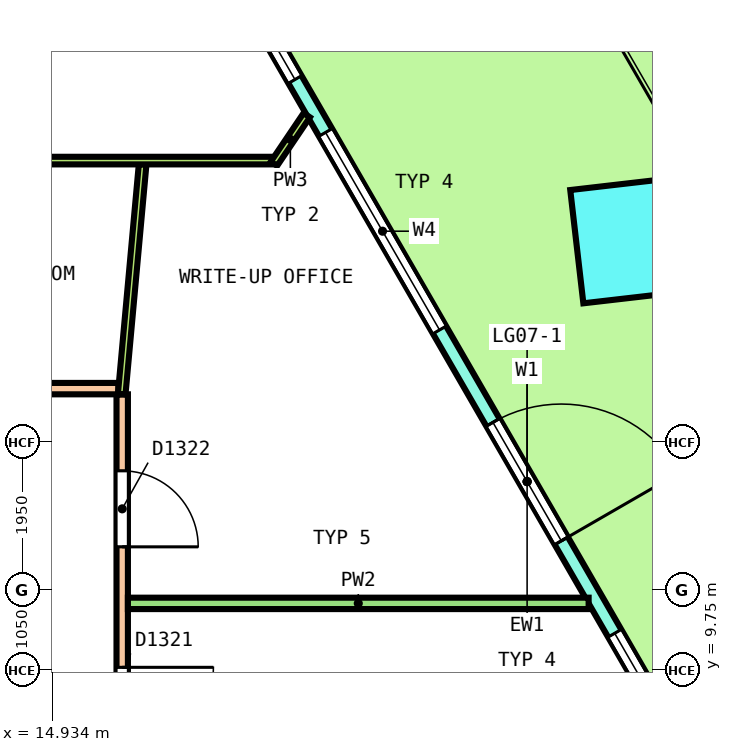
"""IFC4 building model, lengths in metres.
Left out: names, types, materials, properties, quantities, classifications, styles, units other than length and angle.
Written with IfcOpenShell. Run it as: python <this file> out.ifc"""

import sys

from ifc_helpers import new_model, si_unit, direction, frame, frame_2d, origin, origin_2d, place, context, subcontext, project, spatial, polyline, rectangle, outline, extrude, element, fill, save


model = new_model("IFC4")
c1 = context("Model", 3, precision=1e-05, world=origin(), true_north=direction((0.0, 1.0)))
c2 = subcontext(c1, "Body", "Model", "MODEL_VIEW")
j1 = project(units=[si_unit("LENGTHUNIT", "METRE"), si_unit("PLANEANGLEUNIT", "RADIAN")], contexts=[c1])
p1 = place(None, origin())
s1 = spatial("IfcSite", under=j1, at=p1, CompositionType="ELEMENT")
p2 = place(p1, origin())
s2 = spatial("IfcBuilding", under=s1, at=p2, CompositionType="ELEMENT")
p3 = place(p2, frame((0.0, 0.0, 32.2)))
s3 = spatial("IfcBuildingStorey", under=s2, at=p3, CompositionType="ELEMENT", Elevation=32.2)
p4 = place(p3, frame((22.576, 15.404, 0.0), z_axis=(0.029040860623, 0.012532155622, 0.999499661576), x_axis=(-0.499041572146, 0.866570424295, 0.003634419767)))
e1 = element("IfcColumn", 1, at=p4, inside=s3, PredefinedType="COLUMN", context=c2, shape_type="SweptSolid", body=[
    extrude(rectangle(XDim=1.5, YDim=1.5, at=origin_2d()), origin(), (0.0, 0.0, 1.0), 4.052),
])
p5 = place(p3, frame((25.932, 3.99, 0.0), z_axis=(0.0, 0.0, 1.0), x_axis=(-0.500001707189, 0.866024418136, 0.0)))
e2 = element("IfcWall", 2, at=p5, inside=s3, PredefinedType="SOLIDWALL", context=c2, shape_type="SweptSolid", body=[
    extrude(outline(polyline([(-0.027, -0.1), (0.977, -0.1), (1.981, -0.1), (2.985, -0.1), (3.989, -0.1), (4.993, -0.1), (5.997, -0.1), (7.0, -0.1), (8.004, -0.1), (9.008, -0.1), (10.012, -0.1), (11.016, -0.1), (12.02, -0.1), (13.024, -0.1), (14.028, -0.1), (15.032, -0.1), (16.036, -0.1), (17.04, -0.1), (18.043, -0.1), (19.047, -0.1), (18.994, 0.1), (17.995, 0.1), (16.997, 0.1), (15.999, 0.1), (15.001, 0.1), (14.002, 0.1), (13.004, 0.1), (12.006, 0.1), (11.008, 0.1), (10.009, 0.1), (9.011, 0.1), (8.013, 0.1), (7.015, 0.1), (6.016, 0.1), (5.018, 0.1), (4.02, 0.1), (3.022, 0.1), (2.023, 0.1), (1.025, 0.1), (0.027, 0.1), (-0.027, -0.1)])), origin(), (0.0, 0.0, 1.0), 4.1),
])
p6 = place(p5, frame((0.402, 0.0, 0.1)))
e3 = element("IfcOpeningElement", 3, at=p6, cuts=e2, PredefinedType="OPENING", context=c2, shape_type="SweptSolid", body=[
    extrude(rectangle(XDim=3.0, YDim=2.9, at=frame_2d((1.5, 1.45))), frame((0.0, 0.11, 0.0), z_axis=(0.0, -1.0, 0.0), x_axis=(1.0, 0.0, 0.0)), (0.0, 0.0, 1.0), 0.22),
])
p7 = place(p5, frame((4.206, 0.0, 0.1)))
e4 = element("IfcOpeningElement", 4, at=p7, cuts=e2, PredefinedType="OPENING", context=c2, shape_type="SweptSolid", body=[
    extrude(rectangle(XDim=3.0, YDim=2.9, at=frame_2d((1.5, 1.45))), frame((0.0, 0.11, 0.0), z_axis=(0.0, -1.0, 0.0), x_axis=(1.0, 0.0, 0.0)), (0.0, 0.0, 1.0), 0.22),
])
p8 = place(p5, frame((8.61, 0.0, 0.0)))
e5 = element("IfcOpeningElement", 5, at=p8, cuts=e2, PredefinedType="OPENING", context=c2, shape_type="SweptSolid", body=[
    extrude(rectangle(XDim=1.8, YDim=2.4, at=frame_2d((0.9, 1.2))), frame((0.0, 0.11, 0.0), z_axis=(0.0, -1.0, 0.0), x_axis=(1.0, 0.0, 0.0)), (0.0, 0.0, 1.0), 0.22),
])
p9 = place(p5, frame((8.61, 0.0, 2.55)))
e6 = element("IfcOpeningElement", 6, at=p9, cuts=e2, PredefinedType="OPENING", context=c2, shape_type="SweptSolid", body=[
    extrude(rectangle(XDim=1.8, YDim=0.45, at=frame_2d((0.9, 0.225))), frame((0.0, 0.11, 0.0), z_axis=(0.0, -1.0, 0.0), x_axis=(1.0, 0.0, 0.0)), (0.0, 0.0, 1.0), 0.22),
])
p10 = place(p5, frame((11.814, 0.0, 0.1)))
e7 = element("IfcOpeningElement", 7, at=p10, cuts=e2, PredefinedType="OPENING", context=c2, shape_type="SweptSolid", body=[
    extrude(rectangle(XDim=3.0, YDim=2.9, at=frame_2d((1.5, 1.45))), frame((0.0, 0.11, 0.0), z_axis=(0.0, -1.0, 0.0), x_axis=(1.0, 0.0, 0.0)), (0.0, 0.0, 1.0), 0.22),
])
p11 = place(p5, frame((15.618, 0.0, 0.1)))
e8 = element("IfcOpeningElement", 8, at=p11, cuts=e2, PredefinedType="OPENING", context=c2, shape_type="SweptSolid", body=[
    extrude(rectangle(XDim=3.0, YDim=2.9, at=frame_2d((1.5, 1.45))), frame((0.0, 0.11, 0.0), z_axis=(0.0, -1.0, 0.0), x_axis=(1.0, 0.0, 0.0)), (0.0, 0.0, 1.0), 0.22),
])
p12 = place(p3, frame((15.85, -13.375, 0.0), z_axis=(0.0, 0.0, 1.0), x_axis=(0.0, 1.0, 0.0)))
e9 = element("IfcWall", 9, at=p12, inside=s3, PredefinedType="PARTITIONING", context=c2, shape_type="SweptSolid", body=[
    extrude(rectangle(XDim=26.75, YDim=0.15, at=frame_2d((13.375, 0.0))), origin(), (0.0, 0.0, 1.0), 3.05),
])
p13 = place(p12, frame((14.212, 0.0, 0.0)))
e10 = element("IfcOpeningElement", 10, at=p13, cuts=e9, PredefinedType="OPENING", context=c2, shape_type="SweptSolid", body=[
    extrude(rectangle(XDim=1.0, YDim=2.1, at=frame_2d((0.5, 1.05))), frame((0.0, 0.085, 0.0), z_axis=(0.0, -1.0, 0.0), x_axis=(1.0, 0.0, 0.0)), (0.0, 0.0, 1.0), 0.17),
])
p14 = place(p12, frame((21.958, 0.0, 0.0)))
e11 = element("IfcOpeningElement", 11, at=p14, cuts=e9, PredefinedType="OPENING", context=c2, shape_type="SweptSolid", body=[
    extrude(rectangle(XDim=1.2, YDim=2.1, at=frame_2d((0.6, 1.05))), frame((0.0, 0.085, 0.0), z_axis=(0.0, -1.0, 0.0), x_axis=(1.0, 0.0, 0.0)), (0.0, 0.0, 1.0), 0.17),
])
p15 = place(p12, frame((24.743, 0.0, 0.0)))
e12 = element("IfcOpeningElement", 12, at=p15, cuts=e9, PredefinedType="OPENING", context=c2, shape_type="SweptSolid", body=[
    extrude(rectangle(XDim=1.0, YDim=2.1, at=frame_2d((0.5, 1.05))), frame((0.0, 0.085, 0.0), z_axis=(0.0, -1.0, 0.0), x_axis=(1.0, 0.0, 0.0)), (0.0, 0.0, 1.0), 0.17),
])
p16 = place(p12, frame((1.451, 0.0, 0.0)))
e13 = element("IfcOpeningElement", 13, at=p16, cuts=e9, PredefinedType="OPENING", context=c2, shape_type="SweptSolid", body=[
    extrude(rectangle(XDim=1.0, YDim=2.1, at=frame_2d((0.5, 1.05))), frame((0.0, 0.085, 0.0), z_axis=(0.0, -1.0, 0.0), x_axis=(1.0, 0.0, 0.0)), (0.0, 0.0, 1.0), 0.17),
])
p17 = place(p12, frame((4.671, 0.0, 0.0)))
e14 = element("IfcOpeningElement", 14, at=p17, cuts=e9, PredefinedType="OPENING", context=c2, shape_type="SweptSolid", body=[
    extrude(rectangle(XDim=1.2, YDim=2.1, at=frame_2d((0.6, 1.05))), frame((0.0, 0.085, 0.0), z_axis=(0.0, -1.0, 0.0), x_axis=(1.0, 0.0, 0.0)), (0.0, 0.0, 1.0), 0.17),
])
p18 = place(p3, frame((-15.775, 13.45, 0.0), z_axis=(0.0, 0.0, 1.0), x_axis=(1.0, 0.0, 0.0)))
e15 = element("IfcWall", 15, at=p18, inside=s3, PredefinedType="PARTITIONING", context=c2, shape_type="SweptSolid", body=[
    extrude(rectangle(XDim=31.575, YDim=0.15, at=frame_2d((15.788, 0.0))), origin(), (0.0, 0.0, 1.0), 3.05),
])
p19 = place(p18, frame((28.448, 0.0, 0.0)))
e16 = element("IfcOpeningElement", 16, at=p19, cuts=e15, PredefinedType="OPENING", context=c2, shape_type="SweptSolid", body=[
    extrude(rectangle(XDim=1.0, YDim=2.1, at=frame_2d((0.5, 1.05))), frame((0.0, 0.085, 0.0), z_axis=(0.0, -1.0, 0.0), x_axis=(1.0, 0.0, 0.0)), (0.0, 0.0, 1.0), 0.17),
])
p20 = place(p18, frame((24.146, 0.0, 0.0)))
e17 = element("IfcOpeningElement", 17, at=p20, cuts=e15, PredefinedType="OPENING", context=c2, shape_type="SweptSolid", body=[
    extrude(rectangle(XDim=1.2, YDim=2.1, at=frame_2d((0.6, 1.05))), frame((0.0, 0.085, 0.0), z_axis=(0.0, -1.0, 0.0), x_axis=(1.0, 0.0, 0.0)), (0.0, 0.0, 1.0), 0.17),
])
p21 = place(p18, frame((18.378, 0.0, 0.0)))
e18 = element("IfcOpeningElement", 18, at=p21, cuts=e15, PredefinedType="OPENING", context=c2, shape_type="SweptSolid", body=[
    extrude(rectangle(XDim=1.0, YDim=2.1, at=frame_2d((0.5, 1.05))), frame((0.0, 0.085, 0.0), z_axis=(0.0, -1.0, 0.0), x_axis=(1.0, 0.0, 0.0)), (0.0, 0.0, 1.0), 0.17),
])
p22 = place(p18, frame((3.288, 0.0, 0.0)))
e19 = element("IfcOpeningElement", 19, at=p22, cuts=e15, PredefinedType="OPENING", context=c2, shape_type="SweptSolid", body=[
    extrude(rectangle(XDim=1.0, YDim=2.1, at=frame_2d((0.5, 1.05))), frame((0.0, 0.085, 0.0), z_axis=(0.0, -1.0, 0.0), x_axis=(1.0, 0.0, 0.0)), (0.0, 0.0, 1.0), 0.17),
])
p23 = place(p3, frame((15.925, 10.625, 0.0), z_axis=(0.0, 0.0, 1.0), x_axis=(1.0, 0.0, 0.0)))
e20 = element("IfcWall", 20, at=p23, inside=s3, PredefinedType="PARTITIONING", context=c2, shape_type="SweptSolid", body=[
    extrude(rectangle(XDim=6.061, YDim=0.15, at=frame_2d((3.031, 0.0))), origin(), (0.0, 0.0, 1.0), 3.05),
])
p24 = place(p3, frame((15.843, 13.375, 0.0), z_axis=(0.0, 0.0, 1.0), x_axis=(0.090666194534, 0.9958813389, 0.0)))
e21 = element("IfcWall", 21, at=p24, inside=s3, PredefinedType="PARTITIONING", context=c2, shape_type="SweptSolid", body=[
    extrude(rectangle(XDim=3.037, YDim=0.1, at=frame_2d((1.519, 0.0))), origin(), (0.0, 0.0, 1.0), 3.05),
])
p25 = place(p3, frame((10.57, 16.45, 0.0), z_axis=(0.0, 0.0, 1.0), x_axis=(1.0, 0.0, 0.0)))
e22 = element("IfcWall", 22, at=p25, inside=s3, PredefinedType="PARTITIONING", context=c2, shape_type="SweptSolid", body=[
    extrude(rectangle(XDim=7.255, YDim=0.1, at=frame_2d((3.627, 0.0))), origin(), (0.0, 0.0, 1.0), 3.05),
])
p26 = place(p25, frame((2.828, 0.0, 0.0)))
e23 = element("IfcOpeningElement", 23, at=p26, cuts=e22, PredefinedType="OPENING", context=c2, shape_type="SweptSolid", body=[
    extrude(rectangle(XDim=1.0, YDim=2.1, at=frame_2d((0.5, 1.05))), frame((0.0, 0.06, 0.0), z_axis=(0.0, -1.0, 0.0), x_axis=(1.0, 0.0, 0.0)), (0.0, 0.0, 1.0), 0.12),
])
p27 = place(p3, frame((17.847, 16.409, 0.0), z_axis=(0.0, 0.0, 1.0), x_axis=(0.559587069363, 0.828771567925, 0.0)))
e24 = element("IfcWall", 24, at=p27, inside=s3, PredefinedType="PARTITIONING", context=c2, shape_type="SweptSolid", body=[
    extrude(rectangle(XDim=0.771, YDim=0.1, at=frame_2d((0.385, 0.0))), origin(), (0.0, 0.0, 1.0), 3.05),
])
p28 = place(p7, origin())
e25 = element("IfcWindow", 25, at=p28, inside=s3, PartitioningType="SINGLE_PANEL", PredefinedType="WINDOW", context=c2, shape_type="SweptSolid", body=[
    extrude(rectangle(XDim=3.0, YDim=2.9, at=frame_2d((1.5, 1.45))), frame((0.0, 0.03, 0.0), z_axis=(0.0, -1.0, 0.0), x_axis=(1.0, 0.0, 0.0)), (0.0, 0.0, 1.0), 0.06),
])
fill(e4, e25)
p29 = place(p8, origin())
e26 = element("IfcDoor", 26, at=p29, inside=s3, OperationType="DOUBLE_DOOR_SINGLE_SWING", PredefinedType="DOOR", context=c2, shape_type="SweptSolid", body=[
    extrude(rectangle(XDim=1.8, YDim=2.4, at=frame_2d((0.9, 1.2))), frame((0.0, 0.025, 0.0), z_axis=(0.0, -1.0, 0.0), x_axis=(1.0, 0.0, 0.0)), (0.0, 0.0, 1.0), 0.05),
])
fill(e5, e26)
p30 = place(p9, origin())
e27 = element("IfcWindow", 27, at=p30, inside=s3, PartitioningType="SINGLE_PANEL", PredefinedType="WINDOW", context=c2, shape_type="SweptSolid", body=[
    extrude(rectangle(XDim=1.8, YDim=0.45, at=frame_2d((0.9, 0.225))), frame((0.0, 0.03, 0.0), z_axis=(0.0, -1.0, 0.0), x_axis=(1.0, 0.0, 0.0)), (0.0, 0.0, 1.0), 0.06),
])
fill(e6, e27)
p31 = place(p10, origin())
e28 = element("IfcWindow", 28, at=p31, inside=s3, PartitioningType="SINGLE_PANEL", PredefinedType="WINDOW", context=c2, shape_type="SweptSolid", body=[
    extrude(rectangle(XDim=3.0, YDim=2.9, at=frame_2d((1.5, 1.45))), frame((0.0, 0.03, 0.0), z_axis=(0.0, -1.0, 0.0), x_axis=(1.0, 0.0, 0.0)), (0.0, 0.0, 1.0), 0.06),
])
fill(e7, e28)
p32 = place(p11, origin())
e29 = element("IfcWindow", 29, at=p32, inside=s3, PartitioningType="SINGLE_PANEL", PredefinedType="WINDOW", context=c2, shape_type="SweptSolid", body=[
    extrude(rectangle(XDim=3.0, YDim=2.9, at=frame_2d((1.5, 1.45))), frame((0.0, 0.03, 0.0), z_axis=(0.0, -1.0, 0.0), x_axis=(1.0, 0.0, 0.0)), (0.0, 0.0, 1.0), 0.06),
])
fill(e8, e29)
p33 = place(p14, origin())
e30 = element("IfcDoor", 30, at=p33, inside=s3, OperationType="DOUBLE_DOOR_SINGLE_SWING", PredefinedType="DOOR", context=c2, shape_type="SweptSolid", body=[
    extrude(rectangle(XDim=1.2, YDim=2.1, at=frame_2d((0.6, 1.05))), frame((0.0, 0.025, 0.0), z_axis=(0.0, -1.0, 0.0), x_axis=(1.0, 0.0, 0.0)), (0.0, 0.0, 1.0), 0.05),
])
fill(e11, e30)
p34 = place(p15, origin())
e31 = element("IfcDoor", 31, at=p34, inside=s3, OperationType="SINGLE_SWING_LEFT", PredefinedType="DOOR", context=c2, shape_type="SweptSolid", body=[
    extrude(rectangle(XDim=1.0, YDim=2.1, at=frame_2d((0.5, 1.05))), frame((0.0, 0.025, 0.0), z_axis=(0.0, -1.0, 0.0), x_axis=(1.0, 0.0, 0.0)), (0.0, 0.0, 1.0), 0.05),
])
fill(e12, e31)
save(model, sys.argv[1])
